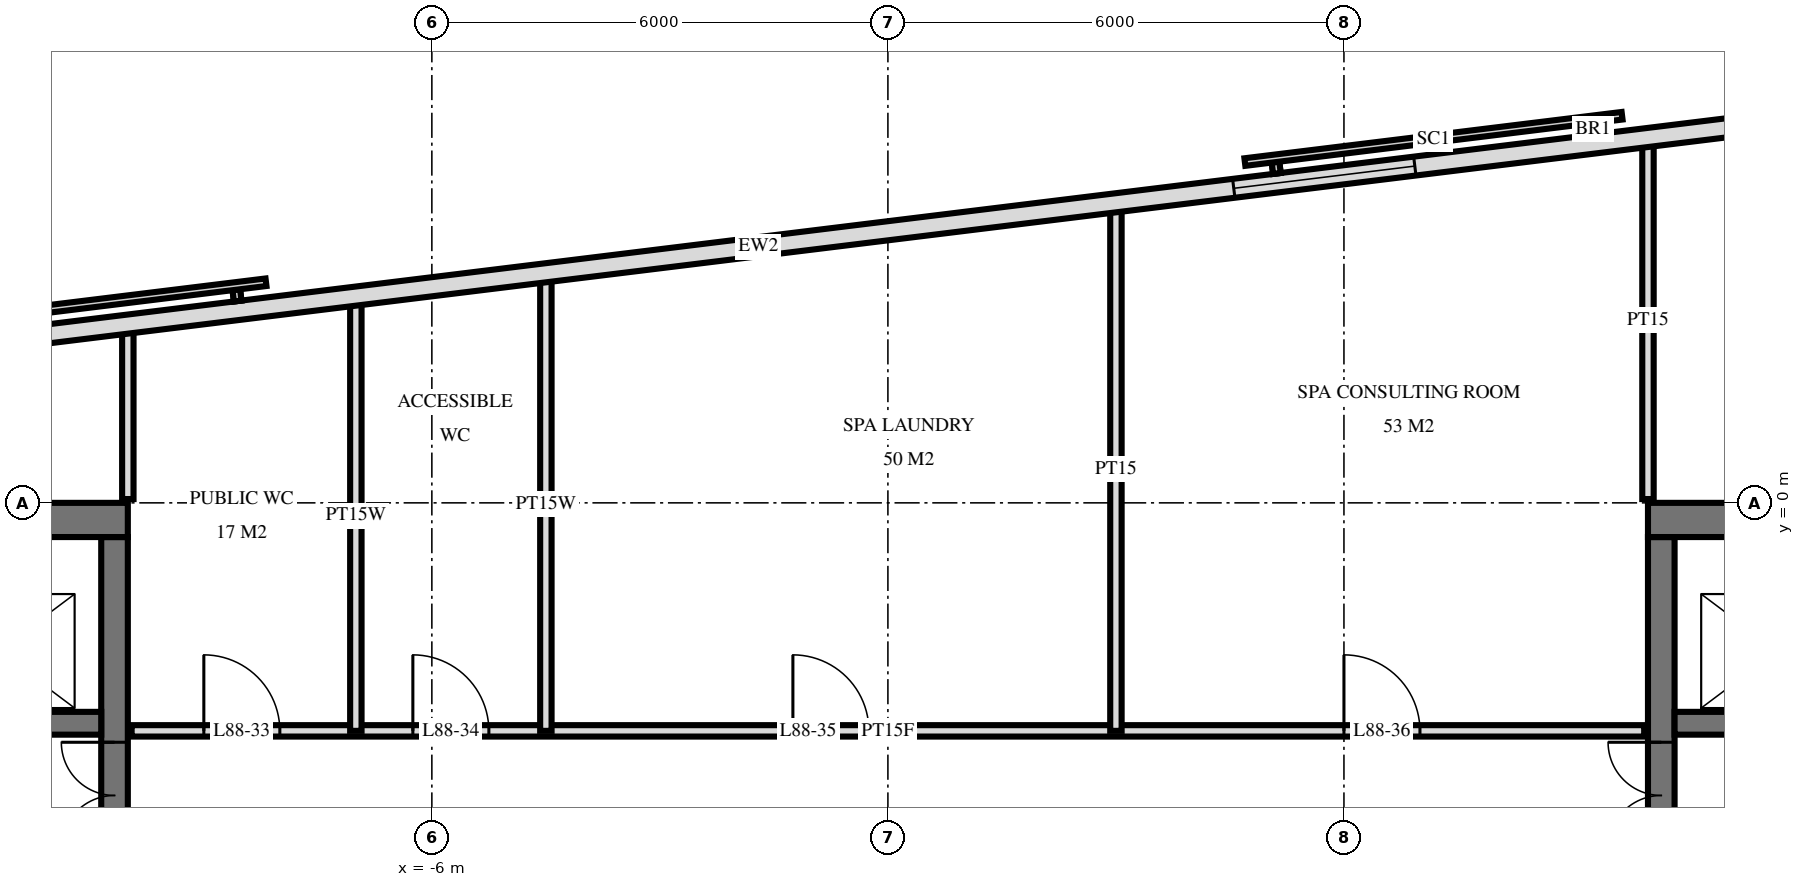
"""IFC4 building model, lengths in metres.
Left out: names, types, materials, properties, quantities, classifications, styles, units other than length and angle.
Written with IfcOpenShell. Run it as: python <this file> out.ifc"""

import sys

from ifc_helpers import new_model, si_unit, direction, frame, frame_2d, origin, place, context, subcontext, project, spatial, rectangle, extrude, element, fill, save


model = new_model("IFC4")
c1 = context("Model", 3, precision=1e-05, world=origin(), true_north=direction((0.0, 1.0)))
c2 = subcontext(c1, "Body", "Model", "MODEL_VIEW")
j1 = project(units=[si_unit("LENGTHUNIT", "METRE"), si_unit("PLANEANGLEUNIT", "RADIAN")], contexts=[c1])
p1 = place(None, origin())
s1 = spatial("IfcSite", under=j1, at=p1, CompositionType="ELEMENT")
p2 = place(p1, origin())
s2 = spatial("IfcBuilding", under=s1, at=p2, CompositionType="ELEMENT")
p3 = place(p2, frame((0.0, 0.0, 334.6)))
s3 = spatial("IfcBuildingStorey", under=s2, at=p3, CompositionType="ELEMENT", Elevation=334.6)
p4 = place(p3, frame((-19.5, -0.225, 0.0), z_axis=(0.0, 0.0, 1.0), x_axis=(1.0, 0.0, 0.0)))
e1 = element("IfcWall", 1, at=p4, inside=s3, PredefinedType="SHEAR", context=c2, shape_type="SweptSolid", body=[
    extrude(rectangle(XDim=9.5, YDim=0.45, at=frame_2d((4.75, 0.0))), origin(), (0.0, 0.0, 1.0), 4.0),
])
p5 = place(p3, frame((-10.175, -14.55, 0.0), z_axis=(0.0, 0.0, 1.0), x_axis=(0.0, 1.0, 0.0)))
e2 = element("IfcWall", 2, at=p5, inside=s3, PredefinedType="SHEAR", context=c2, shape_type="SweptSolid", body=[
    extrude(rectangle(XDim=14.1, YDim=0.35, at=frame_2d((7.05, 0.0))), origin(), (0.0, 0.0, 1.0), 4.0),
])
p6 = place(p5, frame((8.4, 0.0, 0.0)))
e3 = element("IfcOpeningElement", 3, at=p6, cuts=e2, PredefinedType="OPENING", context=c2, shape_type="SweptSolid", body=[
    extrude(rectangle(XDim=1.4, YDim=2.4, at=frame_2d((0.7, 1.2))), frame((0.0, 0.185, 0.0), z_axis=(0.0, -1.0, 0.0), x_axis=(1.0, 0.0, 0.0)), (0.0, 0.0, 1.0), 0.37),
])
p7 = place(p5, frame((10.0, 0.0, 0.0)))
e4 = element("IfcOpeningElement", 4, at=p7, cuts=e2, PredefinedType="OPENING", context=c2, shape_type="SweptSolid", body=[
    extrude(rectangle(XDim=1.4, YDim=2.4, at=frame_2d((0.7, 1.2))), frame((0.0, 0.185, 0.0), z_axis=(0.0, -1.0, 0.0), x_axis=(1.0, 0.0, 0.0)), (0.0, 0.0, 1.0), 0.37),
])
p8 = place(p5, frame((4.0, 0.0, 0.0)))
e5 = element("IfcOpeningElement", 5, at=p8, cuts=e2, PredefinedType="OPENING", context=c2, shape_type="SweptSolid", body=[
    extrude(rectangle(XDim=1.2, YDim=2.1, at=frame_2d((0.6, 1.05))), frame((0.0, 0.185, 0.0), z_axis=(0.0, -1.0, 0.0), x_axis=(1.0, 0.0, 0.0)), (0.0, 0.0, 1.0), 0.37),
])
p9 = place(p3, frame((-19.05, -2.9, 0.0), z_axis=(0.0, 0.0, 1.0), x_axis=(1.0, 0.0, 0.0)))
e6 = element("IfcWall", 6, at=p9, inside=s3, PredefinedType="SHEAR", context=c2, shape_type="SweptSolid", body=[
    extrude(rectangle(XDim=8.7, YDim=0.3, at=frame_2d((4.35, 0.0))), origin(), (0.0, 0.0, 1.0), 4.0),
])
p10 = place(p9, frame((6.8, 0.0, 0.0)))
e7 = element("IfcOpeningElement", 7, at=p10, cuts=e6, PredefinedType="OPENING", context=c2, shape_type="SweptSolid", body=[
    extrude(rectangle(XDim=1.1, YDim=2.1, at=frame_2d((0.55, 1.05))), frame((0.0, 0.16, 0.0), z_axis=(0.0, -1.0, 0.0), x_axis=(1.0, 0.0, 0.0)), (0.0, 0.0, 1.0), 0.32),
])
p11 = place(p9, frame((3.8, 0.0, 0.0)))
e8 = element("IfcOpeningElement", 8, at=p11, cuts=e6, PredefinedType="OPENING", context=c2, shape_type="SweptSolid", body=[
    extrude(rectangle(XDim=1.1, YDim=2.1, at=frame_2d((0.55, 1.05))), frame((0.0, 0.16, 0.0), z_axis=(0.0, -1.0, 0.0), x_axis=(1.0, 0.0, 0.0)), (0.0, 0.0, 1.0), 0.32),
])
p12 = place(p9, frame((1.613, 0.0, 0.0)))
e9 = element("IfcOpeningElement", 9, at=p12, cuts=e6, PredefinedType="OPENING", context=c2, shape_type="SweptSolid", body=[
    extrude(rectangle(XDim=0.9, YDim=2.1, at=frame_2d((0.45, 1.05))), frame((0.0, 0.16, 0.0), z_axis=(0.0, -1.0, 0.0), x_axis=(1.0, 0.0, 0.0)), (0.0, 0.0, 1.0), 0.32),
])
p13 = place(p9, frame((0.188, 0.0, 0.0)))
e10 = element("IfcOpeningElement", 10, at=p13, cuts=e6, PredefinedType="OPENING", context=c2, shape_type="SweptSolid", body=[
    extrude(rectangle(XDim=0.9, YDim=2.1, at=frame_2d((0.45, 1.05))), frame((0.0, 0.16, 0.0), z_axis=(0.0, -1.0, 0.0), x_axis=(1.0, 0.0, 0.0)), (0.0, 0.0, 1.0), 0.32),
])
p14 = place(p3, frame((10.0, -0.225, 0.0), z_axis=(0.0, 0.0, 1.0), x_axis=(1.0, 0.0, 0.0)))
e11 = element("IfcWall", 11, at=p14, inside=s3, PredefinedType="SHEAR", context=c2, shape_type="SweptSolid", body=[
    extrude(rectangle(XDim=9.5, YDim=0.45, at=frame_2d((4.75, 0.0))), origin(), (0.0, 0.0, 1.0), 4.0),
])
p15 = place(p3, frame((10.175, -14.55, 0.0), z_axis=(0.0, 0.0, 1.0), x_axis=(0.0, 1.0, 0.0)))
e12 = element("IfcWall", 12, at=p15, inside=s3, PredefinedType="SHEAR", context=c2, shape_type="SweptSolid", body=[
    extrude(rectangle(XDim=14.1, YDim=0.35, at=frame_2d((7.05, 0.0))), origin(), (0.0, 0.0, 1.0), 4.0),
])
p16 = place(p15, frame((8.4, 0.0, 0.0)))
e13 = element("IfcOpeningElement", 13, at=p16, cuts=e12, PredefinedType="OPENING", context=c2, shape_type="SweptSolid", body=[
    extrude(rectangle(XDim=1.4, YDim=2.4, at=frame_2d((0.7, 1.2))), frame((0.0, 0.185, 0.0), z_axis=(0.0, -1.0, 0.0), x_axis=(1.0, 0.0, 0.0)), (0.0, 0.0, 1.0), 0.37),
])
p17 = place(p15, frame((10.0, 0.0, 0.0)))
e14 = element("IfcOpeningElement", 14, at=p17, cuts=e12, PredefinedType="OPENING", context=c2, shape_type="SweptSolid", body=[
    extrude(rectangle(XDim=1.4, YDim=2.4, at=frame_2d((0.7, 1.2))), frame((0.0, 0.185, 0.0), z_axis=(0.0, -1.0, 0.0), x_axis=(1.0, 0.0, 0.0)), (0.0, 0.0, 1.0), 0.37),
])
p18 = place(p15, frame((4.0, 0.0, 0.0)))
e15 = element("IfcOpeningElement", 15, at=p18, cuts=e12, PredefinedType="OPENING", context=c2, shape_type="SweptSolid", body=[
    extrude(rectangle(XDim=1.2, YDim=2.1, at=frame_2d((0.6, 1.05))), frame((0.0, 0.185, 0.0), z_axis=(0.0, -1.0, 0.0), x_axis=(1.0, 0.0, 0.0)), (0.0, 0.0, 1.0), 0.37),
])
p19 = place(p3, frame((10.35, -2.9, 0.0), z_axis=(0.0, 0.0, 1.0), x_axis=(1.0, 0.0, 0.0)))
e16 = element("IfcWall", 16, at=p19, inside=s3, PredefinedType="SHEAR", context=c2, shape_type="SweptSolid", body=[
    extrude(rectangle(XDim=8.7, YDim=0.3, at=frame_2d((4.35, 0.0))), origin(), (0.0, 0.0, 1.0), 4.0),
])
p20 = place(p19, frame((0.8, 0.0, 0.0)))
e17 = element("IfcOpeningElement", 17, at=p20, cuts=e16, PredefinedType="OPENING", context=c2, shape_type="SweptSolid", body=[
    extrude(rectangle(XDim=1.1, YDim=2.1, at=frame_2d((0.55, 1.05))), frame((0.0, 0.16, 0.0), z_axis=(0.0, -1.0, 0.0), x_axis=(1.0, 0.0, 0.0)), (0.0, 0.0, 1.0), 0.32),
])
p21 = place(p19, frame((3.8, 0.0, 0.0)))
e18 = element("IfcOpeningElement", 18, at=p21, cuts=e16, PredefinedType="OPENING", context=c2, shape_type="SweptSolid", body=[
    extrude(rectangle(XDim=1.1, YDim=2.1, at=frame_2d((0.55, 1.05))), frame((0.0, 0.16, 0.0), z_axis=(0.0, -1.0, 0.0), x_axis=(1.0, 0.0, 0.0)), (0.0, 0.0, 1.0), 0.32),
])
p22 = place(p19, frame((6.188, 0.0, 0.0)))
e19 = element("IfcOpeningElement", 19, at=p22, cuts=e16, PredefinedType="OPENING", context=c2, shape_type="SweptSolid", body=[
    extrude(rectangle(XDim=0.9, YDim=2.1, at=frame_2d((0.45, 1.05))), frame((0.0, 0.16, 0.0), z_axis=(0.0, -1.0, 0.0), x_axis=(1.0, 0.0, 0.0)), (0.0, 0.0, 1.0), 0.32),
])
p23 = place(p19, frame((7.613, 0.0, 0.0)))
e20 = element("IfcOpeningElement", 20, at=p23, cuts=e16, PredefinedType="OPENING", context=c2, shape_type="SweptSolid", body=[
    extrude(rectangle(XDim=0.9, YDim=2.1, at=frame_2d((0.45, 1.05))), frame((0.0, 0.16, 0.0), z_axis=(0.0, -1.0, 0.0), x_axis=(1.0, 0.0, 0.0)), (0.0, 0.0, 1.0), 0.32),
])
p24 = place(p3, frame((16.138, 5.561, 0.0), z_axis=(0.0, 0.0, 1.0), x_axis=(-0.992546726876, -0.121864658405, 0.0)))
e21 = element("IfcWall", 21, at=p24, inside=s3, PredefinedType="SOLIDWALL", context=c2, shape_type="SweptSolid", body=[
    extrude(rectangle(XDim=35.951, YDim=0.25, at=frame_2d((17.975, 0.0))), origin(), (0.0, 0.0, 1.0), 3.72),
])
p25 = place(p24, frame((9.275, 0.0, 0.0)))
e22 = element("IfcOpeningElement", 22, at=p25, cuts=e21, PredefinedType="OPENING", context=c2, shape_type="SweptSolid", body=[
    extrude(rectangle(XDim=2.4, YDim=2.4, at=frame_2d((1.2, 1.2))), frame((0.0, 0.135, 0.0), z_axis=(0.0, -1.0, 0.0), x_axis=(1.0, 0.0, 0.0)), (0.0, 0.0, 1.0), 0.27),
])
p26 = place(p3, frame((10.0, 0.05, 0.0), z_axis=(0.0, 0.0, 1.0), x_axis=(0.0, 1.0, 0.0)))
e23 = element("IfcWall", 23, at=p26, inside=s3, PredefinedType="PARTITIONING", context=c2, shape_type="SweptSolid", body=[
    extrude(rectangle(XDim=4.702, YDim=0.15, at=frame_2d((2.351, 0.0))), origin(), (0.0, 0.0, 1.0), 3.72),
])
p27 = place(p3, frame((3.0, -3.0, 0.0), z_axis=(0.0, 0.0, 1.0), x_axis=(0.0, 1.0, 0.0)))
e24 = element("IfcWall", 24, at=p27, inside=s3, PredefinedType="PARTITIONING", context=c2, shape_type="SweptSolid", body=[
    extrude(rectangle(XDim=6.893, YDim=0.15, at=frame_2d((3.446, 0.0))), origin(), (0.0, 0.0, 1.0), 3.72),
])
p28 = place(p3, frame((-4.5, -3.0, 0.0), z_axis=(0.0, 0.0, 1.0), x_axis=(0.0, 1.0, 0.0)))
e25 = element("IfcWall", 25, at=p28, inside=s3, PredefinedType="PLUMBINGWALL", context=c2, shape_type="SweptSolid", body=[
    extrude(rectangle(XDim=5.972, YDim=0.15, at=frame_2d((2.986, 0.0))), origin(), (0.0, 0.0, 1.0), 3.72),
])
p29 = place(p3, frame((-7.0, -3.0, 0.0), z_axis=(0.0, 0.0, 1.0), x_axis=(0.0, 1.0, 0.0)))
e26 = element("IfcWall", 26, at=p29, inside=s3, PredefinedType="PLUMBINGWALL", context=c2, shape_type="SweptSolid", body=[
    extrude(rectangle(XDim=5.665, YDim=0.15, at=frame_2d((2.833, 0.0))), origin(), (0.0, 0.0, 1.0), 3.72),
])
p30 = place(p3, frame((-10.0, 0.05, 0.0), z_axis=(0.0, 0.0, 1.0), x_axis=(0.0, 1.0, 0.0)))
e27 = element("IfcWall", 27, at=p30, inside=s3, PredefinedType="PLUMBINGWALL", context=c2, shape_type="SweptSolid", body=[
    extrude(rectangle(XDim=2.247, YDim=0.15, at=frame_2d((1.123, 0.0))), origin(), (0.0, 0.0, 1.0), 3.72),
])
p31 = place(p3, frame((-9.95, -3.0, 0.0), z_axis=(0.0, 0.0, 1.0), x_axis=(1.0, 0.0, 0.0)))
e28 = element("IfcWall", 28, at=p31, inside=s3, PredefinedType="PARTITIONING", context=c2, shape_type="SweptSolid", body=[
    extrude(rectangle(XDim=19.9, YDim=0.15, at=frame_2d((9.95, 0.0))), origin(), (0.0, 0.0, 1.0), 3.72),
])
p32 = place(p31, frame((0.95, 0.0, 0.0)))
e29 = element("IfcOpeningElement", 29, at=p32, cuts=e28, PredefinedType="OPENING", context=c2, shape_type="SweptSolid", body=[
    extrude(rectangle(XDim=1.0, YDim=2.1, at=frame_2d((0.5, 1.05))), frame((0.0, 0.085, 0.0), z_axis=(0.0, -1.0, 0.0), x_axis=(1.0, 0.0, 0.0)), (0.0, 0.0, 1.0), 0.17),
])
p33 = place(p31, frame((3.7, 0.0, 0.0)))
e30 = element("IfcOpeningElement", 30, at=p33, cuts=e28, PredefinedType="OPENING", context=c2, shape_type="SweptSolid", body=[
    extrude(rectangle(XDim=1.0, YDim=2.1, at=frame_2d((0.5, 1.05))), frame((0.0, 0.085, 0.0), z_axis=(0.0, -1.0, 0.0), x_axis=(1.0, 0.0, 0.0)), (0.0, 0.0, 1.0), 0.17),
])
p34 = place(p31, frame((8.7, 0.0, 0.0)))
e31 = element("IfcOpeningElement", 31, at=p34, cuts=e28, PredefinedType="OPENING", context=c2, shape_type="SweptSolid", body=[
    extrude(rectangle(XDim=1.0, YDim=2.1, at=frame_2d((0.5, 1.05))), frame((0.0, 0.085, 0.0), z_axis=(0.0, -1.0, 0.0), x_axis=(1.0, 0.0, 0.0)), (0.0, 0.0, 1.0), 0.17),
])
p35 = place(p31, frame((15.95, 0.0, 0.0)))
e32 = element("IfcOpeningElement", 32, at=p35, cuts=e28, PredefinedType="OPENING", context=c2, shape_type="SweptSolid", body=[
    extrude(rectangle(XDim=1.0, YDim=2.1, at=frame_2d((0.5, 1.05))), frame((0.0, 0.085, 0.0), z_axis=(0.0, -1.0, 0.0), x_axis=(1.0, 0.0, 0.0)), (0.0, 0.0, 1.0), 0.17),
])
p36 = place(p25, origin())
e33 = element("IfcWindow", 33, at=p36, inside=s3, PartitioningType="SINGLE_PANEL", PredefinedType="WINDOW", context=c2, shape_type="SweptSolid", body=[
    extrude(rectangle(XDim=2.4, YDim=2.4, at=frame_2d((1.2, 1.2))), frame((0.0, 0.03, 0.0), z_axis=(0.0, -1.0, 0.0), x_axis=(1.0, 0.0, 0.0)), (0.0, 0.0, 1.0), 0.06),
])
fill(e22, e33)
p37 = place(p7, origin())
e34 = element("IfcDoor", 34, at=p37, inside=s3, OperationType="DOUBLE_DOOR_SINGLE_SWING", PredefinedType="DOOR", context=c2, shape_type="SweptSolid", body=[
    extrude(rectangle(XDim=1.4, YDim=2.4, at=frame_2d((0.7, 1.2))), frame((0.0, 0.025, 0.0), z_axis=(0.0, -1.0, 0.0), x_axis=(1.0, 0.0, 0.0)), (0.0, 0.0, 1.0), 0.05),
])
fill(e4, e34)
p38 = place(p17, origin())
e35 = element("IfcDoor", 35, at=p38, inside=s3, OperationType="DOUBLE_DOOR_SINGLE_SWING", PredefinedType="DOOR", context=c2, shape_type="SweptSolid", body=[
    extrude(rectangle(XDim=1.4, YDim=2.4, at=frame_2d((0.7, 1.2))), frame((0.0, 0.025, 0.0), z_axis=(0.0, -1.0, 0.0), x_axis=(1.0, 0.0, 0.0)), (0.0, 0.0, 1.0), 0.05),
])
fill(e14, e35)
p39 = place(p32, origin())
e36 = element("IfcDoor", 36, at=p39, inside=s3, OperationType="SINGLE_SWING_RIGHT", PredefinedType="DOOR", context=c2, shape_type="SweptSolid", body=[
    extrude(rectangle(XDim=1.0, YDim=2.1, at=frame_2d((0.5, 1.05))), frame((0.0, 0.025, 0.0), z_axis=(0.0, -1.0, 0.0), x_axis=(1.0, 0.0, 0.0)), (0.0, 0.0, 1.0), 0.05),
])
fill(e29, e36)
p40 = place(p33, origin())
e37 = element("IfcDoor", 37, at=p40, inside=s3, OperationType="SINGLE_SWING_RIGHT", PredefinedType="DOOR", context=c2, shape_type="SweptSolid", body=[
    extrude(rectangle(XDim=1.0, YDim=2.1, at=frame_2d((0.5, 1.05))), frame((0.0, 0.025, 0.0), z_axis=(0.0, -1.0, 0.0), x_axis=(1.0, 0.0, 0.0)), (0.0, 0.0, 1.0), 0.05),
])
fill(e30, e37)
p41 = place(p34, origin())
e38 = element("IfcDoor", 38, at=p41, inside=s3, OperationType="SINGLE_SWING_RIGHT", PredefinedType="DOOR", context=c2, shape_type="SweptSolid", body=[
    extrude(rectangle(XDim=1.0, YDim=2.1, at=frame_2d((0.5, 1.05))), frame((0.0, 0.025, 0.0), z_axis=(0.0, -1.0, 0.0), x_axis=(1.0, 0.0, 0.0)), (0.0, 0.0, 1.0), 0.05),
])
fill(e31, e38)
p42 = place(p35, origin())
e39 = element("IfcDoor", 39, at=p42, inside=s3, OperationType="SINGLE_SWING_RIGHT", PredefinedType="DOOR", context=c2, shape_type="SweptSolid", body=[
    extrude(rectangle(XDim=1.0, YDim=2.1, at=frame_2d((0.5, 1.05))), frame((0.0, 0.025, 0.0), z_axis=(0.0, -1.0, 0.0), x_axis=(1.0, 0.0, 0.0)), (0.0, 0.0, 1.0), 0.05),
])
fill(e32, e39)
save(model, sys.argv[1])
